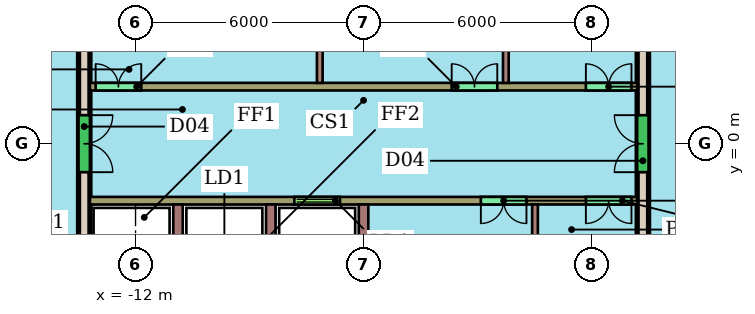
"""IFC4 building model, lengths in metres.
Left out: names, types, materials, properties, quantities, classifications, styles, units other than length and angle.
Written with IfcOpenShell. Run it as: python <this file> out.ifc"""

import sys

from ifc_helpers import new_model, si_unit, direction, frame, frame_2d, origin, place, context, subcontext, project, spatial, rectangle, extrude, element, fill, save


model = new_model("IFC4")
c1 = context("Model", 3, precision=1e-05, world=origin(), true_north=direction((0.0, 1.0)))
c2 = subcontext(c1, "Body", "Model", "MODEL_VIEW")
j1 = project(units=[si_unit("LENGTHUNIT", "METRE"), si_unit("PLANEANGLEUNIT", "RADIAN")], contexts=[c1])
p1 = place(None, origin())
s1 = spatial("IfcSite", under=j1, at=p1, CompositionType="ELEMENT")
p2 = place(p1, origin())
s2 = spatial("IfcBuilding", under=s1, at=p2, CompositionType="ELEMENT")
p3 = place(p2, frame((0.0, 0.0, 312.9)))
s3 = spatial("IfcBuildingStorey", under=s2, at=p3, CompositionType="ELEMENT", Elevation=312.9)
p4 = place(p3, frame((-13.35, 7.3, 0.0), z_axis=(0.0, 0.0, 1.0), x_axis=(0.0, -1.0, 0.0)))
e1 = element("IfcWall", 1, at=p4, inside=s3, PredefinedType="SHEAR", context=c2, shape_type="SweptSolid", body=[
    extrude(rectangle(XDim=14.6, YDim=0.3, at=frame_2d((7.3, 0.0))), origin(), (0.0, 0.0, 1.0), 3.9),
])
p5 = place(p4, frame((6.55, 0.0, 0.0)))
e2 = element("IfcOpeningElement", 2, at=p5, cuts=e1, PredefinedType="OPENING", context=c2, shape_type="SweptSolid", body=[
    extrude(rectangle(XDim=1.5, YDim=2.1, at=frame_2d((0.75, 1.05))), frame((0.0, 0.16, 0.0), z_axis=(0.0, -1.0, 0.0), x_axis=(1.0, 0.0, 0.0)), (0.0, 0.0, 1.0), 0.32),
])
p6 = place(p3, frame((1.35, -7.3, 0.0), z_axis=(0.0, 0.0, 1.0), x_axis=(0.0, 1.0, 0.0)))
e3 = element("IfcWall", 3, at=p6, inside=s3, PredefinedType="SHEAR", context=c2, shape_type="SweptSolid", body=[
    extrude(rectangle(XDim=14.6, YDim=0.3, at=frame_2d((7.3, 0.0))), origin(), (0.0, 0.0, 1.0), 3.9),
])
p7 = place(p6, frame((1.21, 0.0, 0.0)))
e4 = element("IfcOpeningElement", 4, at=p7, cuts=e3, PredefinedType="OPENING", context=c2, shape_type="SweptSolid", body=[
    extrude(rectangle(XDim=1.0, YDim=2.1, at=frame_2d((0.5, 1.05))), frame((0.0, 0.16, 0.0), z_axis=(0.0, -1.0, 0.0), x_axis=(1.0, 0.0, 0.0)), (0.0, 0.0, 1.0), 0.32),
])
p8 = place(p6, frame((6.55, 0.0, 0.0)))
e5 = element("IfcOpeningElement", 5, at=p8, cuts=e3, PredefinedType="OPENING", context=c2, shape_type="SweptSolid", body=[
    extrude(rectangle(XDim=1.5, YDim=2.1, at=frame_2d((0.75, 1.05))), frame((0.0, 0.16, 0.0), z_axis=(0.0, -1.0, 0.0), x_axis=(1.0, 0.0, 0.0)), (0.0, 0.0, 1.0), 0.32),
])
p9 = place(p3, frame((-13.2, 1.5, 0.0), z_axis=(0.0, 0.0, 1.0), x_axis=(1.0, 0.0, 0.0)))
e6 = element("IfcWall", 6, at=p9, inside=s3, PredefinedType="SHEAR", context=c2, shape_type="SweptSolid", body=[
    extrude(rectangle(XDim=14.4, YDim=0.2, at=frame_2d((7.2, 0.0))), origin(), (0.0, 0.0, 1.0), 3.9),
])
p10 = place(p9, frame((0.15, 0.0, 0.0)))
e7 = element("IfcOpeningElement", 7, at=p10, cuts=e6, PredefinedType="OPENING", context=c2, shape_type="SweptSolid", body=[
    extrude(rectangle(XDim=1.2, YDim=2.4, at=frame_2d((0.6, 1.2))), frame((0.0, 0.11, 0.0), z_axis=(0.0, -1.0, 0.0), x_axis=(1.0, 0.0, 0.0)), (0.0, 0.0, 1.0), 0.22),
])
p11 = place(p9, frame((9.519, 0.0, 0.0)))
e8 = element("IfcOpeningElement", 8, at=p11, cuts=e6, PredefinedType="OPENING", context=c2, shape_type="SweptSolid", body=[
    extrude(rectangle(XDim=1.2, YDim=2.4, at=frame_2d((0.6, 1.2))), frame((0.0, 0.11, 0.0), z_axis=(0.0, -1.0, 0.0), x_axis=(1.0, 0.0, 0.0)), (0.0, 0.0, 1.0), 0.22),
])
p12 = place(p9, frame((13.05, 0.0, 0.0)))
e9 = element("IfcOpeningElement", 9, at=p12, cuts=e6, PredefinedType="OPENING", context=c2, shape_type="SweptSolid", body=[
    extrude(rectangle(XDim=1.2, YDim=2.4, at=frame_2d((0.6, 1.2))), frame((0.0, 0.11, 0.0), z_axis=(0.0, -1.0, 0.0), x_axis=(1.0, 0.0, 0.0)), (0.0, 0.0, 1.0), 0.22),
])
p13 = place(p3, frame((1.2, -1.5, 0.0), z_axis=(0.0, 0.0, 1.0), x_axis=(-1.0, 0.0, 0.0)))
e10 = element("IfcWall", 10, at=p13, inside=s3, PredefinedType="SHEAR", context=c2, shape_type="SweptSolid", body=[
    extrude(rectangle(XDim=14.4, YDim=0.2, at=frame_2d((7.2, 0.0))), origin(), (0.0, 0.0, 1.0), 3.9),
])
p14 = place(p13, frame((7.821, 0.0, 0.0)))
e11 = element("IfcOpeningElement", 11, at=p14, cuts=e10, PredefinedType="OPENING", context=c2, shape_type="SweptSolid", body=[
    extrude(rectangle(XDim=1.2, YDim=2.1, at=frame_2d((0.6, 1.05))), frame((0.0, 0.11, 0.0), z_axis=(0.0, -1.0, 0.0), x_axis=(1.0, 0.0, 0.0)), (0.0, 0.0, 1.0), 0.22),
])
p15 = place(p13, frame((2.914, 0.0, 0.0)))
e12 = element("IfcOpeningElement", 12, at=p15, cuts=e10, PredefinedType="OPENING", context=c2, shape_type="SweptSolid", body=[
    extrude(rectangle(XDim=1.2, YDim=2.4, at=frame_2d((0.6, 1.2))), frame((0.0, 0.11, 0.0), z_axis=(0.0, -1.0, 0.0), x_axis=(1.0, 0.0, 0.0)), (0.0, 0.0, 1.0), 0.22),
])
p16 = place(p13, frame((0.15, 0.0, 0.0)))
e13 = element("IfcOpeningElement", 13, at=p16, cuts=e10, PredefinedType="OPENING", context=c2, shape_type="SweptSolid", body=[
    extrude(rectangle(XDim=1.2, YDim=2.4, at=frame_2d((0.6, 1.2))), frame((0.0, 0.11, 0.0), z_axis=(0.0, -1.0, 0.0), x_axis=(1.0, 0.0, 0.0)), (0.0, 0.0, 1.0), 0.22),
])
for number, where, z_axis, x_axis in (
    (14, (-7.152, 1.6, 0.0), (0.0, 0.0, 1.0), (0.0, 1.0, 0.0)),
    (15, (-2.256, 1.6, 0.0), (0.0, 0.0, 1.0), (0.0, 1.0, 0.0)),
):
    element("IfcWall", number, at=place(p3, frame(where, z_axis=z_axis, x_axis=x_axis)), inside=s3, PredefinedType="PARTITIONING", context=c2, shape_type="SweptSolid", body=[
        extrude(rectangle(XDim=1.93, YDim=0.15, at=frame_2d((0.965, 0.0))), origin(), (0.0, 0.0, 1.0), 3.9),
    ])
for number, where, z_axis, x_axis in (
    (16, (-10.883, -1.6, 0.0), (0.0, 0.0, 1.0), (0.0, -1.0, 0.0)),
    (17, (-8.442, -1.6, 0.0), (0.0, 0.0, 1.0), (0.0, -1.0, 0.0)),
    (18, (-6.0, -1.6, 0.0), (0.0, 0.0, 1.0), (0.0, -1.0, 0.0)),
):
    element("IfcWall", number, at=place(p3, frame(where, z_axis=z_axis, x_axis=x_axis)), inside=s3, PredefinedType="SHEAR", context=c2, shape_type="SweptSolid", body=[
        extrude(rectangle(XDim=1.93, YDim=0.25, at=frame_2d((0.965, 0.0))), origin(), (0.0, 0.0, 1.0), 3.9),
    ])
p17 = place(p3, frame((-1.489, -1.6, 0.0), z_axis=(0.0, 0.0, 1.0), x_axis=(0.0, -1.0, 0.0)))
e19 = element("IfcWall", 19, at=p17, inside=s3, PredefinedType="PARTITIONING", context=c2, shape_type="SweptSolid", body=[
    extrude(rectangle(XDim=1.93, YDim=0.15, at=frame_2d((0.965, 0.0))), origin(), (0.0, 0.0, 1.0), 3.9),
])
p18 = place(p5, origin())
e20 = element("IfcDoor", 20, at=p18, inside=s3, OperationType="DOUBLE_DOOR_SINGLE_SWING", PredefinedType="NOTDEFINED", context=c2, shape_type="SweptSolid", body=[
    extrude(rectangle(XDim=1.5, YDim=2.1, at=frame_2d((0.75, 1.05))), frame((0.0, 0.025, 0.0), z_axis=(0.0, -1.0, 0.0), x_axis=(1.0, 0.0, 0.0)), (0.0, 0.0, 1.0), 0.05),
])
fill(e2, e20)
p19 = place(p8, origin())
e21 = element("IfcDoor", 21, at=p19, inside=s3, OperationType="DOUBLE_DOOR_SINGLE_SWING", PredefinedType="NOTDEFINED", context=c2, shape_type="SweptSolid", body=[
    extrude(rectangle(XDim=1.5, YDim=2.1, at=frame_2d((0.75, 1.05))), frame((0.0, 0.025, 0.0), z_axis=(0.0, -1.0, 0.0), x_axis=(1.0, 0.0, 0.0)), (0.0, 0.0, 1.0), 0.05),
])
fill(e5, e21)
p20 = place(p10, origin())
e22 = element("IfcDoor", 22, at=p20, inside=s3, OperationType="DOUBLE_DOOR_SINGLE_SWING", PredefinedType="NOTDEFINED", context=c2, shape_type="SweptSolid", body=[
    extrude(rectangle(XDim=1.2, YDim=2.4, at=frame_2d((0.6, 1.2))), frame((0.0, 0.025, 0.0), z_axis=(0.0, -1.0, 0.0), x_axis=(1.0, 0.0, 0.0)), (0.0, 0.0, 1.0), 0.05),
])
fill(e7, e22)
p21 = place(p11, origin())
e23 = element("IfcDoor", 23, at=p21, inside=s3, OperationType="DOUBLE_DOOR_SINGLE_SWING", PredefinedType="NOTDEFINED", context=c2, shape_type="SweptSolid", body=[
    extrude(rectangle(XDim=1.2, YDim=2.4, at=frame_2d((0.6, 1.2))), frame((0.0, 0.025, 0.0), z_axis=(0.0, -1.0, 0.0), x_axis=(1.0, 0.0, 0.0)), (0.0, 0.0, 1.0), 0.05),
])
fill(e8, e23)
p22 = place(p12, origin())
e24 = element("IfcDoor", 24, at=p22, inside=s3, OperationType="DOUBLE_DOOR_SINGLE_SWING", PredefinedType="NOTDEFINED", context=c2, shape_type="SweptSolid", body=[
    extrude(rectangle(XDim=1.2, YDim=2.4, at=frame_2d((0.6, 1.2))), frame((0.0, 0.025, 0.0), z_axis=(0.0, -1.0, 0.0), x_axis=(1.0, 0.0, 0.0)), (0.0, 0.0, 1.0), 0.05),
])
fill(e9, e24)
p23 = place(p14, origin())
e25 = element("IfcDoor", 25, at=p23, inside=s3, OperationType="DOUBLE_DOOR_SLIDING", PredefinedType="NOTDEFINED", context=c2, shape_type="SweptSolid", body=[
    extrude(rectangle(XDim=1.2, YDim=2.1, at=frame_2d((0.6, 1.05))), frame((0.0, 0.025, 0.0), z_axis=(0.0, -1.0, 0.0), x_axis=(1.0, 0.0, 0.0)), (0.0, 0.0, 1.0), 0.05),
])
fill(e11, e25)
p24 = place(p15, origin())
e26 = element("IfcDoor", 26, at=p24, inside=s3, OperationType="DOUBLE_DOOR_SINGLE_SWING", PredefinedType="NOTDEFINED", context=c2, shape_type="SweptSolid", body=[
    extrude(rectangle(XDim=1.2, YDim=2.4, at=frame_2d((0.6, 1.2))), frame((0.0, 0.025, 0.0), z_axis=(0.0, -1.0, 0.0), x_axis=(1.0, 0.0, 0.0)), (0.0, 0.0, 1.0), 0.05),
])
fill(e12, e26)
p25 = place(p16, origin())
e27 = element("IfcDoor", 27, at=p25, inside=s3, OperationType="DOUBLE_DOOR_SINGLE_SWING", PredefinedType="NOTDEFINED", context=c2, shape_type="SweptSolid", body=[
    extrude(rectangle(XDim=1.2, YDim=2.4, at=frame_2d((0.6, 1.2))), frame((0.0, 0.025, 0.0), z_axis=(0.0, -1.0, 0.0), x_axis=(1.0, 0.0, 0.0)), (0.0, 0.0, 1.0), 0.05),
])
fill(e13, e27)
save(model, sys.argv[1])
